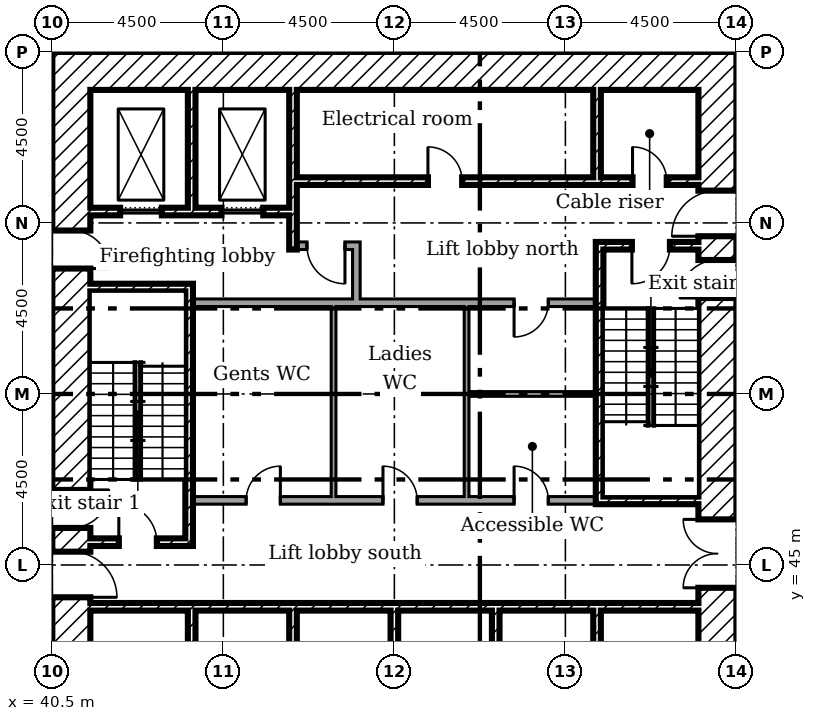
"""IFC4 building model, lengths in metres.
Left out: names, types, materials, properties, quantities, classifications, styles, units other than length and angle.
Written with IfcOpenShell. Run it as: python <this file> out.ifc"""

import sys

from ifc_helpers import new_model, si_unit, direction, frame, frame_2d, origin, place, context, subcontext, project, spatial, rectangle, extrude, element, fill, save


model = new_model("IFC4")
c1 = context("Model", 3, precision=1e-05, world=origin(), true_north=direction((0.0, 1.0)))
c2 = subcontext(c1, "Body", "Model", "MODEL_VIEW")
j1 = project(units=[si_unit("LENGTHUNIT", "METRE"), si_unit("PLANEANGLEUNIT", "RADIAN")], contexts=[c1])
p1 = place(None, origin())
s1 = spatial("IfcSite", under=j1, at=p1, CompositionType="ELEMENT")
p2 = place(p1, origin())
s2 = spatial("IfcBuilding", under=s1, at=p2, CompositionType="ELEMENT")
p3 = place(p2, frame((0.0, 0.0, -4.0)))
s3 = spatial("IfcBuildingStorey", under=s2, at=p3, CompositionType="ELEMENT", Elevation=-4.0)
p4 = place(p3, frame((58.0, 40.5, 0.0), z_axis=(0.0, 0.0, 1.0), x_axis=(0.0, 1.0, 0.0)))
e1 = element("IfcWall", 1, at=p4, inside=s3, PredefinedType="SHEAR", context=c2, shape_type="SweptSolid", body=[
    extrude(rectangle(XDim=18.0, YDim=1.0, at=frame_2d((9.0, 0.0))), origin(), (0.0, 0.0, 1.0), 3.5),
])
p5 = place(p4, frame((13.15, 0.0, 0.0)))
e2 = element("IfcOpeningElement", 2, at=p5, cuts=e1, PredefinedType="OPENING", context=c2, shape_type="SweptSolid", body=[
    extrude(rectangle(XDim=1.2, YDim=2.1, at=frame_2d((0.6, 1.05))), frame((0.0, 0.51, 0.0), z_axis=(0.0, -1.0, 0.0), x_axis=(1.0, 0.0, 0.0)), (0.0, 0.0, 1.0), 1.02),
])
p6 = place(p4, frame((3.9, 0.0, 0.0)))
e3 = element("IfcOpeningElement", 3, at=p6, cuts=e1, PredefinedType="OPENING", context=c2, shape_type="SweptSolid", body=[
    extrude(rectangle(XDim=1.8, YDim=2.1, at=frame_2d((0.9, 1.05))), frame((0.0, 0.51, 0.0), z_axis=(0.0, -1.0, 0.0), x_axis=(1.0, 0.0, 0.0)), (0.0, 0.0, 1.0), 1.02),
])
p7 = place(p4, frame((11.525, 0.0, 0.0)))
e4 = element("IfcOpeningElement", 4, at=p7, cuts=e1, PredefinedType="OPENING", context=c2, shape_type="SweptSolid", body=[
    extrude(rectangle(XDim=1.0, YDim=2.1, at=frame_2d((0.5, 1.05))), frame((0.0, 0.51, 0.0), z_axis=(0.0, -1.0, 0.0), x_axis=(1.0, 0.0, 0.0)), (0.0, 0.0, 1.0), 1.02),
])
p8 = place(p3, frame((41.5, 58.0, 0.0)))
e5 = element("IfcWall", 5, at=p8, inside=s3, PredefinedType="SHEAR", context=c2, shape_type="SweptSolid", body=[
    extrude(rectangle(XDim=16.0, YDim=1.0, at=frame_2d((8.0, 0.0))), origin(), (0.0, 0.0, 1.0), 3.5),
])
p9 = place(p3, frame((41.0, 40.5, 0.0), z_axis=(0.0, 0.0, 1.0), x_axis=(0.0, 1.0, 0.0)))
e6 = element("IfcWall", 6, at=p9, inside=s3, PredefinedType="SHEAR", context=c2, shape_type="SweptSolid", body=[
    extrude(rectangle(XDim=18.0, YDim=1.0, at=frame_2d((9.0, 0.0))), origin(), (0.0, 0.0, 1.0), 3.5),
])
p10 = place(p9, frame((3.65, 0.0, 0.0)))
e7 = element("IfcOpeningElement", 7, at=p10, cuts=e6, PredefinedType="OPENING", context=c2, shape_type="SweptSolid", body=[
    extrude(rectangle(XDim=1.2, YDim=2.1, at=frame_2d((0.6, 1.05))), frame((0.0, 0.51, 0.0), z_axis=(0.0, -1.0, 0.0), x_axis=(1.0, 0.0, 0.0)), (0.0, 0.0, 1.0), 1.02),
])
p11 = place(p9, frame((5.475, 0.0, 0.0)))
e8 = element("IfcOpeningElement", 8, at=p11, cuts=e6, PredefinedType="OPENING", context=c2, shape_type="SweptSolid", body=[
    extrude(rectangle(XDim=1.0, YDim=2.1, at=frame_2d((0.5, 1.05))), frame((0.0, 0.51, 0.0), z_axis=(0.0, -1.0, 0.0), x_axis=(1.0, 0.0, 0.0)), (0.0, 0.0, 1.0), 1.02),
])
p12 = place(p9, frame((12.3, 0.0, 0.0)))
e9 = element("IfcOpeningElement", 9, at=p12, cuts=e6, PredefinedType="OPENING", context=c2, shape_type="SweptSolid", body=[
    extrude(rectangle(XDim=1.0, YDim=2.1, at=frame_2d((0.5, 1.05))), frame((0.0, 0.51, 0.0), z_axis=(0.0, -1.0, 0.0), x_axis=(1.0, 0.0, 0.0)), (0.0, 0.0, 1.0), 1.02),
])
p13 = place(p3, frame((44.167, 57.5, 0.0), z_axis=(0.0, 0.0, 1.0), x_axis=(0.0, -1.0, 0.0)))
e10 = element("IfcWall", 10, at=p13, inside=s3, PredefinedType="SHEAR", context=c2, shape_type="SweptSolid", body=[
    extrude(rectangle(XDim=3.1, YDim=0.2, at=frame_2d((1.55, 0.0))), origin(), (0.0, 0.0, 1.0), 3.5),
])
p14 = place(p3, frame((46.833, 57.5, 0.0), z_axis=(0.0, 0.0, 1.0), x_axis=(0.0, -1.0, 0.0)))
e11 = element("IfcWall", 11, at=p14, inside=s3, PredefinedType="SHEAR", context=c2, shape_type="SweptSolid", body=[
    extrude(rectangle(XDim=4.2, YDim=0.2, at=frame_2d((2.1, 0.0))), origin(), (0.0, 0.0, 1.0), 3.5),
])
for number, where, z_axis, x_axis in (
    (12, (54.833, 57.5, 0.0), (0.0, 0.0, 1.0), (0.0, -1.0, 0.0)),
    (13, (44.167, 41.5, 0.0), (0.0, 0.0, 1.0), (0.0, 1.0, 0.0)),
    (14, (46.833, 41.5, 0.0), (0.0, 0.0, 1.0), (0.0, 1.0, 0.0)),
    (15, (49.5, 41.5, 0.0), (0.0, 0.0, 1.0), (0.0, 1.0, 0.0)),
    (16, (52.167, 41.5, 0.0), (0.0, 0.0, 1.0), (0.0, 1.0, 0.0)),
    (17, (54.833, 41.5, 0.0), (0.0, 0.0, 1.0), (0.0, 1.0, 0.0)),
):
    element("IfcWall", number, at=place(p3, frame(where, z_axis=z_axis, x_axis=x_axis)), inside=s3, PredefinedType="SHEAR", context=c2, shape_type="SweptSolid", body=[
        extrude(rectangle(XDim=2.3, YDim=0.2, at=frame_2d((1.15, 0.0))), origin(), (0.0, 0.0, 1.0), 3.5),
    ])
p15 = place(p3, frame((48.5, 51.9, 0.0), z_axis=(0.0, 0.0, 1.0), x_axis=(0.0, 1.0, 0.0)))
e18 = element("IfcWall", 18, at=p15, inside=s3, PredefinedType="PARTITIONING", context=c2, shape_type="SweptSolid", body=[
    extrude(rectangle(XDim=1.6, YDim=0.2, at=frame_2d((0.8, 0.0))), origin(), (0.0, 0.0, 1.0), 3.5),
])
p16 = place(p3, frame((46.933, 53.4, 0.0)))
e19 = element("IfcWall", 19, at=p16, inside=s3, PredefinedType="PARTITIONING", context=c2, shape_type="SweptSolid", body=[
    extrude(rectangle(XDim=1.467, YDim=0.2, at=frame_2d((0.733, 0.0))), origin(), (0.0, 0.0, 1.0), 3.5),
])
p17 = place(p16, frame((0.267, 0.0, 0.0)))
e20 = element("IfcOpeningElement", 20, at=p17, cuts=e19, PredefinedType="OPENING", context=c2, shape_type="SweptSolid", body=[
    extrude(rectangle(XDim=1.0, YDim=2.1, at=frame_2d((0.5, 1.05))), frame((0.0, 0.11, 0.0), z_axis=(0.0, -1.0, 0.0), x_axis=(1.0, 0.0, 0.0)), (0.0, 0.0, 1.0), 0.22),
])
p18 = place(p3, frame((46.933, 55.1, 0.0)))
e21 = element("IfcWall", 21, at=p18, inside=s3, PredefinedType="SHEAR", context=c2, shape_type="SweptSolid", body=[
    extrude(rectangle(XDim=10.567, YDim=0.2, at=frame_2d((5.283, 0.0))), origin(), (0.0, 0.0, 1.0), 3.5),
])
p19 = place(p18, frame((8.833, 0.0, 0.0)))
e22 = element("IfcOpeningElement", 22, at=p19, cuts=e21, PredefinedType="OPENING", context=c2, shape_type="SweptSolid", body=[
    extrude(rectangle(XDim=0.9, YDim=2.1, at=frame_2d((0.45, 1.05))), frame((0.0, 0.11, 0.0), z_axis=(0.0, -1.0, 0.0), x_axis=(1.0, 0.0, 0.0)), (0.0, 0.0, 1.0), 0.22),
])
p20 = place(p18, frame((3.45, 0.0, 0.0)))
e23 = element("IfcOpeningElement", 23, at=p20, cuts=e21, PredefinedType="OPENING", context=c2, shape_type="SweptSolid", body=[
    extrude(rectangle(XDim=0.9, YDim=2.1, at=frame_2d((0.45, 1.05))), frame((0.0, 0.11, 0.0), z_axis=(0.0, -1.0, 0.0), x_axis=(1.0, 0.0, 0.0)), (0.0, 0.0, 1.0), 0.22),
])
p21 = place(p3, frame((41.5, 54.3, 0.0)))
e24 = element("IfcWall", 24, at=p21, inside=s3, PredefinedType="SHEAR", context=c2, shape_type="SweptSolid", body=[
    extrude(rectangle(XDim=5.233, YDim=0.2, at=frame_2d((2.617, 0.0))), origin(), (0.0, 0.0, 1.0), 3.5),
])
p22 = place(p21, frame((0.783, 0.0, 0.0)))
e25 = element("IfcOpeningElement", 25, at=p22, cuts=e24, PredefinedType="OPENING", context=c2, shape_type="SweptSolid", body=[
    extrude(rectangle(XDim=1.1, YDim=2.1, at=frame_2d((0.55, 1.05))), frame((0.0, 0.11, 0.0), z_axis=(0.0, -1.0, 0.0), x_axis=(1.0, 0.0, 0.0)), (0.0, 0.0, 1.0), 0.22),
])
p23 = place(p21, frame((3.45, 0.0, 0.0)))
e26 = element("IfcOpeningElement", 26, at=p23, cuts=e24, PredefinedType="OPENING", context=c2, shape_type="SweptSolid", body=[
    extrude(rectangle(XDim=1.1, YDim=2.1, at=frame_2d((0.55, 1.05))), frame((0.0, 0.11, 0.0), z_axis=(0.0, -1.0, 0.0), x_axis=(1.0, 0.0, 0.0)), (0.0, 0.0, 1.0), 0.22),
])
p24 = place(p3, frame((41.5, 43.9, 0.0)))
e27 = element("IfcWall", 27, at=p24, inside=s3, PredefinedType="SHEAR", context=c2, shape_type="SweptSolid", body=[
    extrude(rectangle(XDim=16.0, YDim=0.2, at=frame_2d((8.0, 0.0))), origin(), (0.0, 0.0, 1.0), 3.5),
])
p25 = place(p3, frame((44.1, 45.5, 0.0), z_axis=(0.0, 0.0, 1.0), x_axis=(0.0, 1.0, 0.0)))
e28 = element("IfcWall", 28, at=p25, inside=s3, PredefinedType="SHEAR", context=c2, shape_type="SweptSolid", body=[
    extrude(rectangle(XDim=6.9, YDim=0.2, at=frame_2d((3.45, 0.0))), origin(), (0.0, 0.0, 1.0), 3.5),
])
p26 = place(p3, frame((41.5, 52.3, 0.0)))
e29 = element("IfcWall", 29, at=p26, inside=s3, PredefinedType="SHEAR", context=c2, shape_type="SweptSolid", body=[
    extrude(rectangle(XDim=2.5, YDim=0.2, at=frame_2d((1.25, 0.0))), origin(), (0.0, 0.0, 1.0), 3.5),
])
p27 = place(p3, frame((41.5, 45.6, 0.0)))
e30 = element("IfcWall", 30, at=p27, inside=s3, PredefinedType="SHEAR", context=c2, shape_type="SweptSolid", body=[
    extrude(rectangle(XDim=2.5, YDim=0.2, at=frame_2d((1.25, 0.0))), origin(), (0.0, 0.0, 1.0), 3.5),
])
p28 = place(p27, frame((0.75, 0.0, 0.0)))
e31 = element("IfcOpeningElement", 31, at=p28, cuts=e30, PredefinedType="OPENING", context=c2, shape_type="SweptSolid", body=[
    extrude(rectangle(XDim=1.0, YDim=2.1, at=frame_2d((0.5, 1.05))), frame((0.0, 0.11, 0.0), z_axis=(0.0, -1.0, 0.0), x_axis=(1.0, 0.0, 0.0)), (0.0, 0.0, 1.0), 0.22),
])
p29 = place(p3, frame((54.8, 53.4, 0.0)))
e32 = element("IfcWall", 32, at=p29, inside=s3, PredefinedType="SHEAR", context=c2, shape_type="SweptSolid", body=[
    extrude(rectangle(XDim=2.7, YDim=0.2, at=frame_2d((1.35, 0.0))), origin(), (0.0, 0.0, 1.0), 3.5),
])
p30 = place(p29, frame((0.95, 0.0, 0.0)))
e33 = element("IfcOpeningElement", 33, at=p30, cuts=e32, PredefinedType="OPENING", context=c2, shape_type="SweptSolid", body=[
    extrude(rectangle(XDim=1.0, YDim=2.1, at=frame_2d((0.5, 1.05))), frame((0.0, 0.11, 0.0), z_axis=(0.0, -1.0, 0.0), x_axis=(1.0, 0.0, 0.0)), (0.0, 0.0, 1.0), 0.22),
])
p31 = place(p3, frame((54.8, 46.7, 0.0)))
e34 = element("IfcWall", 34, at=p31, inside=s3, PredefinedType="SHEAR", context=c2, shape_type="SweptSolid", body=[
    extrude(rectangle(XDim=2.7, YDim=0.2, at=frame_2d((1.35, 0.0))), origin(), (0.0, 0.0, 1.0), 3.5),
])
p32 = place(p3, frame((54.9, 46.8, 0.0), z_axis=(0.0, 0.0, 1.0), x_axis=(0.0, 1.0, 0.0)))
e35 = element("IfcWall", 35, at=p32, inside=s3, PredefinedType="SHEAR", context=c2, shape_type="SweptSolid", body=[
    extrude(rectangle(XDim=6.5, YDim=0.2, at=frame_2d((3.25, 0.0))), origin(), (0.0, 0.0, 1.0), 3.5),
])
p33 = place(p3, frame((44.2, 51.9, 0.0)))
e36 = element("IfcWall", 36, at=p33, inside=s3, PredefinedType="PARTITIONING", context=c2, shape_type="SweptSolid", body=[
    extrude(rectangle(XDim=10.6, YDim=0.2, at=frame_2d((5.3, 0.0))), origin(), (0.0, 0.0, 1.0), 3.5),
])
p34 = place(p33, frame((8.45, 0.0, 0.0)))
e37 = element("IfcOpeningElement", 37, at=p34, cuts=e36, PredefinedType="OPENING", context=c2, shape_type="SweptSolid", body=[
    extrude(rectangle(XDim=0.9, YDim=2.1, at=frame_2d((0.45, 1.05))), frame((0.0, 0.11, 0.0), z_axis=(0.0, -1.0, 0.0), x_axis=(1.0, 0.0, 0.0)), (0.0, 0.0, 1.0), 0.22),
])
p35 = place(p3, frame((44.2, 46.7, 0.0)))
e38 = element("IfcWall", 38, at=p35, inside=s3, PredefinedType="PARTITIONING", context=c2, shape_type="SweptSolid", body=[
    extrude(rectangle(XDim=10.6, YDim=0.2, at=frame_2d((5.3, 0.0))), origin(), (0.0, 0.0, 1.0), 3.5),
])
p36 = place(p35, frame((1.4, 0.0, 0.0)))
e39 = element("IfcOpeningElement", 39, at=p36, cuts=e38, PredefinedType="OPENING", context=c2, shape_type="SweptSolid", body=[
    extrude(rectangle(XDim=0.9, YDim=2.1, at=frame_2d((0.45, 1.05))), frame((0.0, 0.11, 0.0), z_axis=(0.0, -1.0, 0.0), x_axis=(1.0, 0.0, 0.0)), (0.0, 0.0, 1.0), 0.22),
])
p37 = place(p35, frame((5.0, 0.0, 0.0)))
e40 = element("IfcOpeningElement", 40, at=p37, cuts=e38, PredefinedType="OPENING", context=c2, shape_type="SweptSolid", body=[
    extrude(rectangle(XDim=0.9, YDim=2.1, at=frame_2d((0.45, 1.05))), frame((0.0, 0.11, 0.0), z_axis=(0.0, -1.0, 0.0), x_axis=(1.0, 0.0, 0.0)), (0.0, 0.0, 1.0), 0.22),
])
p38 = place(p35, frame((8.45, 0.0, 0.0)))
e41 = element("IfcOpeningElement", 41, at=p38, cuts=e38, PredefinedType="OPENING", context=c2, shape_type="SweptSolid", body=[
    extrude(rectangle(XDim=0.9, YDim=2.1, at=frame_2d((0.45, 1.05))), frame((0.0, 0.11, 0.0), z_axis=(0.0, -1.0, 0.0), x_axis=(1.0, 0.0, 0.0)), (0.0, 0.0, 1.0), 0.22),
])
p39 = place(p3, frame((47.9, 46.8, 0.0), z_axis=(0.0, 0.0, 1.0), x_axis=(0.0, 1.0, 0.0)))
e42 = element("IfcWall", 42, at=p39, inside=s3, PredefinedType="PARTITIONING", context=c2, shape_type="SweptSolid", body=[
    extrude(rectangle(XDim=5.0, YDim=0.125, at=frame_2d((2.5, 0.0))), origin(), (0.0, 0.0, 1.0), 3.5),
])
p40 = place(p3, frame((51.4, 46.8, 0.0), z_axis=(0.0, 0.0, 1.0), x_axis=(0.0, 1.0, 0.0)))
e43 = element("IfcWall", 43, at=p40, inside=s3, PredefinedType="PARTITIONING", context=c2, shape_type="SweptSolid", body=[
    extrude(rectangle(XDim=2.762, YDim=0.125, at=frame_2d((1.381, 0.0))), origin(), (0.0, 0.0, 1.0), 3.5),
])
p41 = place(p3, frame((54.8, 49.5, 0.0), z_axis=(0.0, 0.0, 1.0), x_axis=(-1.0, 0.0, 0.0)))
e44 = element("IfcWall", 44, at=p41, inside=s3, PredefinedType="PARTITIONING", context=c2, shape_type="SweptSolid", body=[
    extrude(rectangle(XDim=3.338, YDim=0.125, at=frame_2d((1.669, 0.0))), origin(), (0.0, 0.0, 1.0), 3.5),
])
p42 = place(p3, frame((51.4, 49.5, 0.0), z_axis=(0.0, 0.0, 1.0), x_axis=(0.0, 1.0, 0.0)))
e45 = element("IfcWall", 45, at=p42, inside=s3, PredefinedType="PARTITIONING", context=c2, shape_type="SweptSolid", body=[
    extrude(rectangle(XDim=2.3, YDim=0.125, at=frame_2d((1.15, 0.0))), origin(), (0.0, 0.0, 1.0), 3.5),
])
p43 = place(p5, origin())
e46 = element("IfcDoor", 46, at=p43, inside=s3, OperationType="SINGLE_SWING_RIGHT", PredefinedType="DOOR", context=c2, shape_type="SweptSolid", body=[
    extrude(rectangle(XDim=1.2, YDim=2.1, at=frame_2d((0.6, 1.05))), frame((0.0, 0.025, 0.0), z_axis=(0.0, -1.0, 0.0), x_axis=(1.0, 0.0, 0.0)), (0.0, 0.0, 1.0), 0.05),
])
fill(e2, e46)
p44 = place(p6, origin())
e47 = element("IfcDoor", 47, at=p44, inside=s3, OperationType="DOUBLE_DOOR_SINGLE_SWING", PredefinedType="DOOR", context=c2, shape_type="SweptSolid", body=[
    extrude(rectangle(XDim=1.8, YDim=2.1, at=frame_2d((0.9, 1.05))), frame((0.0, 0.025, 0.0), z_axis=(0.0, -1.0, 0.0), x_axis=(1.0, 0.0, 0.0)), (0.0, 0.0, 1.0), 0.05),
])
fill(e3, e47)
p45 = place(p10, frame((1.2, 0.0, 0.0), x_axis=(-1.0, 0.0, 0.0)))
e48 = element("IfcDoor", 48, at=p45, inside=s3, OperationType="SINGLE_SWING_LEFT", PredefinedType="DOOR", context=c2, shape_type="SweptSolid", body=[
    extrude(rectangle(XDim=1.2, YDim=2.1, at=frame_2d((0.6, 1.05))), frame((0.0, 0.025, 0.0), z_axis=(0.0, -1.0, 0.0), x_axis=(1.0, 0.0, 0.0)), (0.0, 0.0, 1.0), 0.05),
])
fill(e7, e48)
p46 = place(p28, origin())
e49 = element("IfcDoor", 49, at=p46, inside=s3, OperationType="SINGLE_SWING_RIGHT", PredefinedType="DOOR", context=c2, shape_type="SweptSolid", body=[
    extrude(rectangle(XDim=1.0, YDim=2.1, at=frame_2d((0.5, 1.05))), frame((0.0, 0.025, 0.0), z_axis=(0.0, -1.0, 0.0), x_axis=(1.0, 0.0, 0.0)), (0.0, 0.0, 1.0), 0.05),
])
fill(e31, e49)
p47 = place(p11, frame((1.0, 0.0, 0.0), x_axis=(-1.0, 0.0, 0.0)))
e50 = element("IfcDoor", 50, at=p47, inside=s3, OperationType="SINGLE_SWING_RIGHT", PredefinedType="DOOR", context=c2, shape_type="SweptSolid", body=[
    extrude(rectangle(XDim=1.0, YDim=2.1, at=frame_2d((0.5, 1.05))), frame((0.0, 0.025, 0.0), z_axis=(0.0, -1.0, 0.0), x_axis=(1.0, 0.0, 0.0)), (0.0, 0.0, 1.0), 0.05),
])
fill(e8, e50)
p48 = place(p30, frame((1.0, 0.0, 0.0), x_axis=(-1.0, 0.0, 0.0)))
e51 = element("IfcDoor", 51, at=p48, inside=s3, OperationType="SINGLE_SWING_LEFT", PredefinedType="DOOR", context=c2, shape_type="SweptSolid", body=[
    extrude(rectangle(XDim=1.0, YDim=2.1, at=frame_2d((0.5, 1.05))), frame((0.0, 0.025, 0.0), z_axis=(0.0, -1.0, 0.0), x_axis=(1.0, 0.0, 0.0)), (0.0, 0.0, 1.0), 0.05),
])
fill(e33, e51)
p49 = place(p7, origin())
e52 = element("IfcDoor", 52, at=p49, inside=s3, OperationType="SINGLE_SWING_RIGHT", PredefinedType="DOOR", context=c2, shape_type="SweptSolid", body=[
    extrude(rectangle(XDim=1.0, YDim=2.1, at=frame_2d((0.5, 1.05))), frame((0.0, 0.025, 0.0), z_axis=(0.0, -1.0, 0.0), x_axis=(1.0, 0.0, 0.0)), (0.0, 0.0, 1.0), 0.05),
])
fill(e4, e52)
p50 = place(p17, frame((1.0, 0.0, 0.0), x_axis=(-1.0, 0.0, 0.0)))
e53 = element("IfcDoor", 53, at=p50, inside=s3, OperationType="SINGLE_SWING_RIGHT", PredefinedType="DOOR", context=c2, shape_type="SweptSolid", body=[
    extrude(rectangle(XDim=1.0, YDim=2.1, at=frame_2d((0.5, 1.05))), frame((0.0, 0.025, 0.0), z_axis=(0.0, -1.0, 0.0), x_axis=(1.0, 0.0, 0.0)), (0.0, 0.0, 1.0), 0.05),
])
fill(e20, e53)
p51 = place(p12, frame((1.0, 0.0, 0.0), x_axis=(-1.0, 0.0, 0.0)))
e54 = element("IfcDoor", 54, at=p51, inside=s3, OperationType="SINGLE_SWING_LEFT", PredefinedType="DOOR", context=c2, shape_type="SweptSolid", body=[
    extrude(rectangle(XDim=1.0, YDim=2.1, at=frame_2d((0.5, 1.05))), frame((0.0, 0.025, 0.0), z_axis=(0.0, -1.0, 0.0), x_axis=(1.0, 0.0, 0.0)), (0.0, 0.0, 1.0), 0.05),
])
fill(e9, e54)
p52 = place(p19, origin())
e55 = element("IfcDoor", 55, at=p52, inside=s3, OperationType="SINGLE_SWING_RIGHT", PredefinedType="DOOR", context=c2, shape_type="SweptSolid", body=[
    extrude(rectangle(XDim=0.9, YDim=2.1, at=frame_2d((0.45, 1.05))), frame((0.0, 0.025, 0.0), z_axis=(0.0, -1.0, 0.0), x_axis=(1.0, 0.0, 0.0)), (0.0, 0.0, 1.0), 0.05),
])
fill(e22, e55)
p53 = place(p20, origin())
e56 = element("IfcDoor", 56, at=p53, inside=s3, OperationType="SINGLE_SWING_RIGHT", PredefinedType="DOOR", context=c2, shape_type="SweptSolid", body=[
    extrude(rectangle(XDim=0.9, YDim=2.1, at=frame_2d((0.45, 1.05))), frame((0.0, 0.025, 0.0), z_axis=(0.0, -1.0, 0.0), x_axis=(1.0, 0.0, 0.0)), (0.0, 0.0, 1.0), 0.05),
])
fill(e23, e56)
p54 = place(p36, origin())
e57 = element("IfcDoor", 57, at=p54, inside=s3, OperationType="SINGLE_SWING_LEFT", PredefinedType="DOOR", context=c2, shape_type="SweptSolid", body=[
    extrude(rectangle(XDim=0.9, YDim=2.1, at=frame_2d((0.45, 1.05))), frame((0.0, 0.025, 0.0), z_axis=(0.0, -1.0, 0.0), x_axis=(1.0, 0.0, 0.0)), (0.0, 0.0, 1.0), 0.05),
])
fill(e39, e57)
p55 = place(p37, origin())
e58 = element("IfcDoor", 58, at=p55, inside=s3, OperationType="SINGLE_SWING_RIGHT", PredefinedType="DOOR", context=c2, shape_type="SweptSolid", body=[
    extrude(rectangle(XDim=0.9, YDim=2.1, at=frame_2d((0.45, 1.05))), frame((0.0, 0.025, 0.0), z_axis=(0.0, -1.0, 0.0), x_axis=(1.0, 0.0, 0.0)), (0.0, 0.0, 1.0), 0.05),
])
fill(e40, e58)
p56 = place(p38, origin())
e59 = element("IfcDoor", 59, at=p56, inside=s3, OperationType="SINGLE_SWING_RIGHT", PredefinedType="DOOR", context=c2, shape_type="SweptSolid", body=[
    extrude(rectangle(XDim=0.9, YDim=2.1, at=frame_2d((0.45, 1.05))), frame((0.0, 0.025, 0.0), z_axis=(0.0, -1.0, 0.0), x_axis=(1.0, 0.0, 0.0)), (0.0, 0.0, 1.0), 0.05),
])
fill(e41, e59)
p57 = place(p34, frame((0.9, 0.0, 0.0), x_axis=(-1.0, 0.0, 0.0)))
e60 = element("IfcDoor", 60, at=p57, inside=s3, OperationType="SINGLE_SWING_LEFT", PredefinedType="DOOR", context=c2, shape_type="SweptSolid", body=[
    extrude(rectangle(XDim=0.9, YDim=2.1, at=frame_2d((0.45, 1.05))), frame((0.0, 0.025, 0.0), z_axis=(0.0, -1.0, 0.0), x_axis=(1.0, 0.0, 0.0)), (0.0, 0.0, 1.0), 0.05),
])
fill(e37, e60)
p58 = place(p22, origin())
e61 = element("IfcDoor", 61, at=p58, inside=s3, OperationType="SLIDING_TO_LEFT", PredefinedType="DOOR", context=c2, shape_type="SweptSolid", body=[
    extrude(rectangle(XDim=1.1, YDim=2.1, at=frame_2d((0.55, 1.05))), frame((0.0, 0.025, 0.0), z_axis=(0.0, -1.0, 0.0), x_axis=(1.0, 0.0, 0.0)), (0.0, 0.0, 1.0), 0.05),
])
fill(e25, e61)
p59 = place(p23, origin())
e62 = element("IfcDoor", 62, at=p59, inside=s3, OperationType="SLIDING_TO_LEFT", PredefinedType="DOOR", context=c2, shape_type="SweptSolid", body=[
    extrude(rectangle(XDim=1.1, YDim=2.1, at=frame_2d((0.55, 1.05))), frame((0.0, 0.025, 0.0), z_axis=(0.0, -1.0, 0.0), x_axis=(1.0, 0.0, 0.0)), (0.0, 0.0, 1.0), 0.05),
])
fill(e26, e62)
save(model, sys.argv[1])
